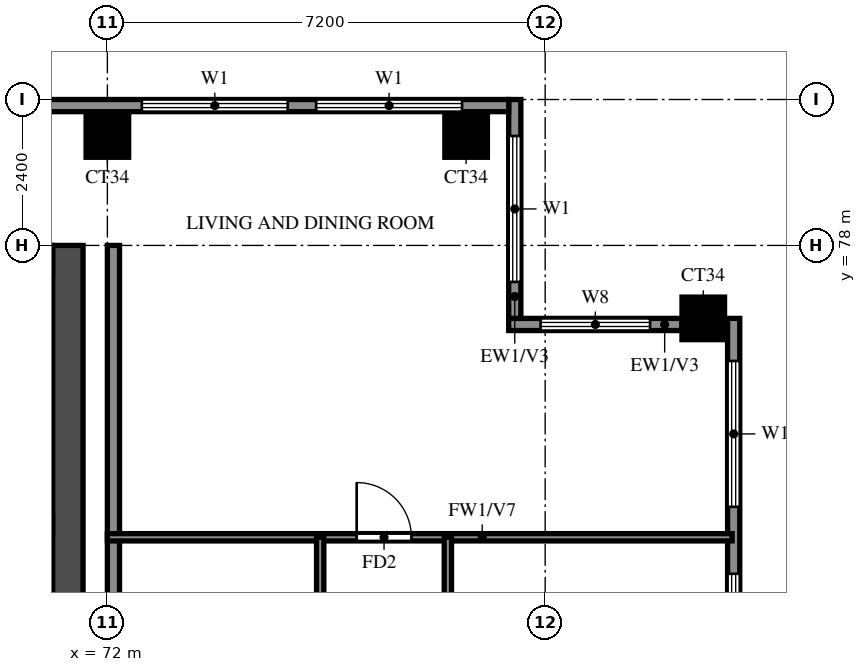
"""IFC4 building model, lengths in metres.
Left out: names, types, materials, properties, quantities, classifications, styles, units other than length and angle.
Written with IfcOpenShell. Run it as: python <this file> out.ifc"""

import sys

from ifc_helpers import new_model, si_unit, direction, frame, frame_2d, origin, origin_2d, place, context, subcontext, project, spatial, rectangle, extrude, source, transform, mapped, element, fill, save


model = new_model("IFC4")
c1 = context("Model", 3, precision=1e-05, world=origin(), true_north=direction((0.0, 1.0)))
c2 = subcontext(c1, "Body", "Model", "MODEL_VIEW")
j1 = project(units=[si_unit("LENGTHUNIT", "METRE"), si_unit("PLANEANGLEUNIT", "RADIAN")], contexts=[c1])
p1 = place(None, origin())
s1 = spatial("IfcSite", under=j1, at=p1, CompositionType="ELEMENT")
p2 = place(p1, origin())
s2 = spatial("IfcBuilding", under=s1, at=p2, CompositionType="ELEMENT")
p3 = place(p2, frame((0.0, 0.0, 222.0)))
s3 = spatial("IfcBuildingStorey", under=s2, at=p3, CompositionType="ELEMENT", Elevation=222.0)
m1 = source(origin(), c2, "Body", "SweptSolid", [
    extrude(rectangle(XDim=0.7, YDim=0.7, at=origin_2d()), origin(), (0.0, 0.0, 1.0), 3.22),
])
for number, where, z_axis, x_axis in (
    (1, (81.8, 76.8, 0.0), (0.0, 0.0, 1.0), (1.0, 0.0, 0.0)),
    (2, (72.0, 79.8, 0.0), (0.0, 0.0, 1.0), (1.0, 0.0, 0.0)),
    (3, (77.9, 79.8, 0.0), (0.0, 0.0, 1.0), (1.0, 0.0, 0.0)),
):
    element("IfcColumn", number, at=place(p3, frame(where, z_axis=z_axis, x_axis=x_axis)), inside=s3, PredefinedType="COLUMN", context=c2, shape_type="MappedRepresentation", body=[
        mapped(m1, transform((0.0, 0.0, 0.0))),
    ])
p4 = place(p3, frame((71.35, 66.15, 0.0), z_axis=(0.0, 0.0, 1.0), x_axis=(0.0, 1.0, 0.0)))
e4 = element("IfcWall", 4, at=p4, inside=s3, PredefinedType="SHEAR", context=c2, shape_type="SweptSolid", body=[
    extrude(rectangle(XDim=11.85, YDim=0.5, at=frame_2d((5.925, 0.0))), origin(), (0.0, 0.0, 1.0), 3.22),
])
p5 = place(p3, frame((29.7, 77.75, 0.0), z_axis=(0.0, 0.0, 1.0), x_axis=(1.0, 0.0, 0.0)))
e5 = element("IfcWall", 5, at=p5, inside=s3, PredefinedType="SHEAR", context=c2, shape_type="SweptSolid", body=[
    extrude(rectangle(XDim=41.4, YDim=0.5, at=frame_2d((20.7, 0.0))), origin(), (0.0, 0.0, 1.0), 3.22),
])
p6 = place(p3, frame((82.3, 48.2, 0.0), z_axis=(0.0, 0.0, 1.0), x_axis=(0.0, 1.0, 0.0)))
e6 = element("IfcWall", 6, at=p6, inside=s3, PredefinedType="SOLIDWALL", context=c2, shape_type="SweptSolid", body=[
    extrude(rectangle(XDim=28.6, YDim=0.2, at=frame_2d((14.3, 0.0))), origin(), (0.0, 0.0, 1.0), 3.22),
])
p7 = place(p6, frame((11.5, 0.0, 0.0)))
e7 = element("IfcOpeningElement", 7, at=p7, cuts=e6, PredefinedType="OPENING", context=c2, shape_type="SweptSolid", body=[
    extrude(rectangle(XDim=1.8, YDim=2.4, at=frame_2d((0.9, 1.2))), frame((0.0, 0.11, 0.0), z_axis=(0.0, -1.0, 0.0), x_axis=(1.0, 0.0, 0.0)), (0.0, 0.0, 1.0), 0.22),
])
p8 = place(p6, frame((0.6, 0.0, 0.6)))
e8 = element("IfcOpeningElement", 8, at=p8, cuts=e6, PredefinedType="OPENING", context=c2, shape_type="SweptSolid", body=[
    extrude(rectangle(XDim=2.4, YDim=2.4, at=frame_2d((1.2, 1.2))), frame((0.0, 0.11, 0.0), z_axis=(0.0, -1.0, 0.0), x_axis=(1.0, 0.0, 0.0)), (0.0, 0.0, 1.0), 0.22),
])
p9 = place(p6, frame((4.75, 0.0, 1.5)))
e9 = element("IfcOpeningElement", 9, at=p9, cuts=e6, PredefinedType="OPENING", context=c2, shape_type="SweptSolid", body=[
    extrude(rectangle(XDim=0.9, YDim=0.9, at=frame_2d((0.45, 0.45))), frame((0.0, 0.11, 0.0), z_axis=(0.0, -1.0, 0.0), x_axis=(1.0, 0.0, 0.0)), (0.0, 0.0, 1.0), 0.22),
])
p10 = place(p6, frame((7.3, 0.0, 0.6)))
e10 = element("IfcOpeningElement", 10, at=p10, cuts=e6, PredefinedType="OPENING", context=c2, shape_type="SweptSolid", body=[
    extrude(rectangle(XDim=1.8, YDim=2.4, at=frame_2d((0.9, 1.2))), frame((0.0, 0.11, 0.0), z_axis=(0.0, -1.0, 0.0), x_axis=(1.0, 0.0, 0.0)), (0.0, 0.0, 1.0), 0.22),
])
p11 = place(p6, frame((10.15, 0.0, 0.6)))
e11 = element("IfcOpeningElement", 11, at=p11, cuts=e6, PredefinedType="OPENING", context=c2, shape_type="SweptSolid", body=[
    extrude(rectangle(XDim=0.9, YDim=2.4, at=frame_2d((0.45, 1.2))), frame((0.0, 0.11, 0.0), z_axis=(0.0, -1.0, 0.0), x_axis=(1.0, 0.0, 0.0)), (0.0, 0.0, 1.0), 0.22),
])
p12 = place(p6, frame((14.5, 0.0, 0.6)))
e12 = element("IfcOpeningElement", 12, at=p12, cuts=e6, PredefinedType="OPENING", context=c2, shape_type="SweptSolid", body=[
    extrude(rectangle(XDim=1.2, YDim=2.4, at=frame_2d((0.6, 1.2))), frame((0.0, 0.11, 0.0), z_axis=(0.0, -1.0, 0.0), x_axis=(1.0, 0.0, 0.0)), (0.0, 0.0, 1.0), 0.22),
])
p13 = place(p6, frame((16.75, 0.0, 0.6)))
e13 = element("IfcOpeningElement", 13, at=p13, cuts=e6, PredefinedType="OPENING", context=c2, shape_type="SweptSolid", body=[
    extrude(rectangle(XDim=0.9, YDim=2.4, at=frame_2d((0.45, 1.2))), frame((0.0, 0.11, 0.0), z_axis=(0.0, -1.0, 0.0), x_axis=(1.0, 0.0, 0.0)), (0.0, 0.0, 1.0), 0.22),
])
p14 = place(p6, frame((18.4, 0.0, 0.6)))
e14 = element("IfcOpeningElement", 14, at=p14, cuts=e6, PredefinedType="OPENING", context=c2, shape_type="SweptSolid", body=[
    extrude(rectangle(XDim=2.4, YDim=2.4, at=frame_2d((1.2, 1.2))), frame((0.0, 0.11, 0.0), z_axis=(0.0, -1.0, 0.0), x_axis=(1.0, 0.0, 0.0)), (0.0, 0.0, 1.0), 0.22),
])
p15 = place(p6, frame((22.0, 0.0, 0.6)))
e15 = element("IfcOpeningElement", 15, at=p15, cuts=e6, PredefinedType="OPENING", context=c2, shape_type="SweptSolid", body=[
    extrude(rectangle(XDim=2.4, YDim=2.4, at=frame_2d((1.2, 1.2))), frame((0.0, 0.11, 0.0), z_axis=(0.0, -1.0, 0.0), x_axis=(1.0, 0.0, 0.0)), (0.0, 0.0, 1.0), 0.22),
])
p16 = place(p6, frame((25.5, 0.0, 0.6)))
e16 = element("IfcOpeningElement", 16, at=p16, cuts=e6, PredefinedType="OPENING", context=c2, shape_type="SweptSolid", body=[
    extrude(rectangle(XDim=2.4, YDim=2.4, at=frame_2d((1.2, 1.2))), frame((0.0, 0.11, 0.0), z_axis=(0.0, -1.0, 0.0), x_axis=(1.0, 0.0, 0.0)), (0.0, 0.0, 1.0), 0.22),
])
p17 = place(p3, frame((81.45, 76.7, 0.0), z_axis=(0.0, 0.0, 1.0), x_axis=(-1.0, 0.0, 0.0)))
e17 = element("IfcWall", 17, at=p17, inside=s3, PredefinedType="SOLIDWALL", context=c2, shape_type="SweptSolid", body=[
    extrude(rectangle(XDim=2.85, YDim=0.2, at=frame_2d((1.425, 0.0))), origin(), (0.0, 0.0, 1.0), 3.22),
])
p18 = place(p17, frame((0.525, 0.0, 0.6)))
e18 = element("IfcOpeningElement", 18, at=p18, cuts=e17, PredefinedType="OPENING", context=c2, shape_type="SweptSolid", body=[
    extrude(rectangle(XDim=1.8, YDim=2.4, at=frame_2d((0.9, 1.2))), frame((0.0, 0.11, 0.0), z_axis=(0.0, -1.0, 0.0), x_axis=(1.0, 0.0, 0.0)), (0.0, 0.0, 1.0), 0.22),
])
p19 = place(p3, frame((78.7, 76.8, 0.0), z_axis=(0.0, 0.0, 1.0), x_axis=(0.0, 1.0, 0.0)))
e19 = element("IfcWall", 19, at=p19, inside=s3, PredefinedType="SOLIDWALL", context=c2, shape_type="SweptSolid", body=[
    extrude(rectangle(XDim=3.6, YDim=0.2, at=frame_2d((1.8, 0.0))), origin(), (0.0, 0.0, 1.0), 3.22),
])
p20 = place(p19, frame((0.6, 0.0, 0.6)))
e20 = element("IfcOpeningElement", 20, at=p20, cuts=e19, PredefinedType="OPENING", context=c2, shape_type="SweptSolid", body=[
    extrude(rectangle(XDim=2.4, YDim=2.4, at=frame_2d((1.2, 1.2))), frame((0.0, 0.11, 0.0), z_axis=(0.0, -1.0, 0.0), x_axis=(1.0, 0.0, 0.0)), (0.0, 0.0, 1.0), 0.22),
])
p21 = place(p3, frame((78.6, 80.3, 0.0), z_axis=(0.0, 0.0, 1.0), x_axis=(-1.0, 0.0, 0.0)))
e21 = element("IfcWall", 21, at=p21, inside=s3, PredefinedType="SOLIDWALL", context=c2, shape_type="SweptSolid", body=[
    extrude(rectangle(XDim=56.6, YDim=0.2, at=frame_2d((28.3, 0.0))), origin(), (0.0, 0.0, 1.0), 3.22),
])
p22 = place(p21, frame((50.433, 0.0, 0.6)))
e22 = element("IfcOpeningElement", 22, at=p22, cuts=e21, PredefinedType="OPENING", context=c2, shape_type="SweptSolid", body=[
    extrude(rectangle(XDim=2.4, YDim=2.4, at=frame_2d((1.2, 1.2))), frame((0.0, 0.11, 0.0), z_axis=(0.0, -1.0, 0.0), x_axis=(1.0, 0.0, 0.0)), (0.0, 0.0, 1.0), 0.22),
])
p23 = place(p21, frame((53.367, 0.0, 0.6)))
e23 = element("IfcOpeningElement", 23, at=p23, cuts=e21, PredefinedType="OPENING", context=c2, shape_type="SweptSolid", body=[
    extrude(rectangle(XDim=2.4, YDim=2.4, at=frame_2d((1.2, 1.2))), frame((0.0, 0.11, 0.0), z_axis=(0.0, -1.0, 0.0), x_axis=(1.0, 0.0, 0.0)), (0.0, 0.0, 1.0), 0.22),
])
p24 = place(p21, frame((0.767, 0.0, 0.6)))
e24 = element("IfcOpeningElement", 24, at=p24, cuts=e21, PredefinedType="OPENING", context=c2, shape_type="SweptSolid", body=[
    extrude(rectangle(XDim=2.4, YDim=2.4, at=frame_2d((1.2, 1.2))), frame((0.0, 0.11, 0.0), z_axis=(0.0, -1.0, 0.0), x_axis=(1.0, 0.0, 0.0)), (0.0, 0.0, 1.0), 0.22),
])
p25 = place(p21, frame((3.633, 0.0, 0.6)))
e25 = element("IfcOpeningElement", 25, at=p25, cuts=e21, PredefinedType="OPENING", context=c2, shape_type="SweptSolid", body=[
    extrude(rectangle(XDim=2.4, YDim=2.4, at=frame_2d((1.2, 1.2))), frame((0.0, 0.11, 0.0), z_axis=(0.0, -1.0, 0.0), x_axis=(1.0, 0.0, 0.0)), (0.0, 0.0, 1.0), 0.22),
])
p26 = place(p3, frame((72.1, 62.4, 0.0), z_axis=(0.0, 0.0, 1.0), x_axis=(0.0, 1.0, 0.0)))
e26 = element("IfcWall", 26, at=p26, inside=s3, PredefinedType="SOLIDWALL", context=c2, shape_type="SweptSolid", body=[
    extrude(rectangle(XDim=15.6, YDim=0.2, at=frame_2d((7.8, 0.0))), origin(), (0.0, 0.0, 1.0), 3.22),
])
p27 = place(p3, frame((72.0, 73.2, 0.0), z_axis=(0.0, 0.0, 1.0), x_axis=(1.0, 0.0, 0.0)))
e27 = element("IfcWall", 27, at=p27, inside=s3, PredefinedType="PARTITIONING", context=c2, shape_type="SweptSolid", body=[
    extrude(rectangle(XDim=10.275, YDim=0.12, at=frame_2d((5.137, 0.0))), origin(), (0.0, 0.0, 1.0), 2.32),
])
p28 = place(p27, frame((4.1, 0.0, 0.0)))
e28 = element("IfcOpeningElement", 28, at=p28, cuts=e27, PredefinedType="OPENING", context=c2, shape_type="SweptSolid", body=[
    extrude(rectangle(XDim=0.9, YDim=2.1, at=frame_2d((0.45, 1.05))), frame((0.0, 0.07, 0.0), z_axis=(0.0, -1.0, 0.0), x_axis=(1.0, 0.0, 0.0)), (0.0, 0.0, 1.0), 0.14),
])
p29 = place(p3, frame((75.5, 64.8, 0.0), z_axis=(0.0, 0.0, 1.0), x_axis=(0.0, 1.0, 0.0)))
e29 = element("IfcWall", 29, at=p29, inside=s3, PredefinedType="PARTITIONING", context=c2, shape_type="SweptSolid", body=[
    extrude(rectangle(XDim=8.4, YDim=0.12, at=frame_2d((4.2, 0.0))), origin(), (0.0, 0.0, 1.0), 3.22),
])
p30 = place(p29, frame((1.925, 0.0, 0.0)))
e30 = element("IfcOpeningElement", 30, at=p30, cuts=e29, PredefinedType="OPENING", context=c2, shape_type="SweptSolid", body=[
    extrude(rectangle(XDim=0.9, YDim=2.1, at=frame_2d((0.45, 1.05))), frame((0.0, 0.07, 0.0), z_axis=(0.0, -1.0, 0.0), x_axis=(1.0, 0.0, 0.0)), (0.0, 0.0, 1.0), 0.14),
])
p31 = place(p29, frame((6.175, 0.0, 0.0)))
e31 = element("IfcOpeningElement", 31, at=p31, cuts=e29, PredefinedType="OPENING", context=c2, shape_type="SweptSolid", body=[
    extrude(rectangle(XDim=0.8, YDim=2.1, at=frame_2d((0.4, 1.05))), frame((0.0, 0.07, 0.0), z_axis=(0.0, -1.0, 0.0), x_axis=(1.0, 0.0, 0.0)), (0.0, 0.0, 1.0), 0.14),
])
p32 = place(p3, frame((77.6, 55.2, 0.0), z_axis=(0.0, 0.0, 1.0), x_axis=(0.0, 1.0, 0.0)))
e32 = element("IfcWall", 32, at=p32, inside=s3, PredefinedType="PARTITIONING", context=c2, shape_type="SweptSolid", body=[
    extrude(rectangle(XDim=18.0, YDim=0.12, at=frame_2d((9.0, 0.0))), origin(), (0.0, 0.0, 1.0), 3.22),
])
p33 = place(p32, frame((2.85, 0.0, 0.0)))
e33 = element("IfcOpeningElement", 33, at=p33, cuts=e32, PredefinedType="OPENING", context=c2, shape_type="SweptSolid", body=[
    extrude(rectangle(XDim=1.5, YDim=2.1, at=frame_2d((0.75, 1.05))), frame((0.0, 0.07, 0.0), z_axis=(0.0, -1.0, 0.0), x_axis=(1.0, 0.0, 0.0)), (0.0, 0.0, 1.0), 0.14),
])
p34 = place(p32, frame((8.55, 0.0, 0.0)))
e34 = element("IfcOpeningElement", 34, at=p34, cuts=e32, PredefinedType="OPENING", context=c2, shape_type="SweptSolid", body=[
    extrude(rectangle(XDim=0.9, YDim=2.1, at=frame_2d((0.45, 1.05))), frame((0.0, 0.07, 0.0), z_axis=(0.0, -1.0, 0.0), x_axis=(1.0, 0.0, 0.0)), (0.0, 0.0, 1.0), 0.14),
])
p35 = place(p32, frame((12.15, 0.0, 0.0)))
e35 = element("IfcOpeningElement", 35, at=p35, cuts=e32, PredefinedType="OPENING", context=c2, shape_type="SweptSolid", body=[
    extrude(rectangle(XDim=0.9, YDim=2.1, at=frame_2d((0.45, 1.05))), frame((0.0, 0.07, 0.0), z_axis=(0.0, -1.0, 0.0), x_axis=(1.0, 0.0, 0.0)), (0.0, 0.0, 1.0), 0.14),
])
p36 = place(p32, frame((15.75, 0.0, 0.0)))
e36 = element("IfcOpeningElement", 36, at=p36, cuts=e32, PredefinedType="OPENING", context=c2, shape_type="SweptSolid", body=[
    extrude(rectangle(XDim=0.9, YDim=2.1, at=frame_2d((0.45, 1.05))), frame((0.0, 0.07, 0.0), z_axis=(0.0, -1.0, 0.0), x_axis=(1.0, 0.0, 0.0)), (0.0, 0.0, 1.0), 0.14),
])
p37 = place(p15, origin())
e37 = element("IfcWindow", 37, at=p37, inside=s3, PartitioningType="DOUBLE_PANEL_VERTICAL", PredefinedType="WINDOW", context=c2, shape_type="SweptSolid", body=[
    extrude(rectangle(XDim=2.4, YDim=2.4, at=frame_2d((1.2, 1.2))), frame((0.0, 0.03, 0.0), z_axis=(0.0, -1.0, 0.0), x_axis=(1.0, 0.0, 0.0)), (0.0, 0.0, 1.0), 0.06),
])
fill(e15, e37)
p38 = place(p16, origin())
e38 = element("IfcWindow", 38, at=p38, inside=s3, PartitioningType="DOUBLE_PANEL_VERTICAL", PredefinedType="WINDOW", context=c2, shape_type="SweptSolid", body=[
    extrude(rectangle(XDim=2.4, YDim=2.4, at=frame_2d((1.2, 1.2))), frame((0.0, 0.03, 0.0), z_axis=(0.0, -1.0, 0.0), x_axis=(1.0, 0.0, 0.0)), (0.0, 0.0, 1.0), 0.06),
])
fill(e16, e38)
p39 = place(p18, origin())
e39 = element("IfcWindow", 39, at=p39, inside=s3, PartitioningType="DOUBLE_PANEL_VERTICAL", PredefinedType="WINDOW", context=c2, shape_type="SweptSolid", body=[
    extrude(rectangle(XDim=1.8, YDim=2.4, at=frame_2d((0.9, 1.2))), frame((0.0, 0.03, 0.0), z_axis=(0.0, -1.0, 0.0), x_axis=(1.0, 0.0, 0.0)), (0.0, 0.0, 1.0), 0.06),
])
fill(e18, e39)
p40 = place(p20, origin())
e40 = element("IfcWindow", 40, at=p40, inside=s3, PartitioningType="DOUBLE_PANEL_VERTICAL", PredefinedType="WINDOW", context=c2, shape_type="SweptSolid", body=[
    extrude(rectangle(XDim=2.4, YDim=2.4, at=frame_2d((1.2, 1.2))), frame((0.0, 0.03, 0.0), z_axis=(0.0, -1.0, 0.0), x_axis=(1.0, 0.0, 0.0)), (0.0, 0.0, 1.0), 0.06),
])
fill(e20, e40)
p41 = place(p24, origin())
e41 = element("IfcWindow", 41, at=p41, inside=s3, PartitioningType="DOUBLE_PANEL_VERTICAL", PredefinedType="WINDOW", context=c2, shape_type="SweptSolid", body=[
    extrude(rectangle(XDim=2.4, YDim=2.4, at=frame_2d((1.2, 1.2))), frame((0.0, 0.03, 0.0), z_axis=(0.0, -1.0, 0.0), x_axis=(1.0, 0.0, 0.0)), (0.0, 0.0, 1.0), 0.06),
])
fill(e24, e41)
p42 = place(p25, origin())
e42 = element("IfcWindow", 42, at=p42, inside=s3, PartitioningType="DOUBLE_PANEL_VERTICAL", PredefinedType="WINDOW", context=c2, shape_type="SweptSolid", body=[
    extrude(rectangle(XDim=2.4, YDim=2.4, at=frame_2d((1.2, 1.2))), frame((0.0, 0.03, 0.0), z_axis=(0.0, -1.0, 0.0), x_axis=(1.0, 0.0, 0.0)), (0.0, 0.0, 1.0), 0.06),
])
fill(e25, e42)
p43 = place(p28, origin())
e43 = element("IfcDoor", 43, at=p43, inside=s3, OperationType="SINGLE_SWING_LEFT", PredefinedType="DOOR", context=c2, shape_type="SweptSolid", body=[
    extrude(rectangle(XDim=0.9, YDim=2.1, at=frame_2d((0.45, 1.05))), frame((0.0, 0.025, 0.0), z_axis=(0.0, -1.0, 0.0), x_axis=(1.0, 0.0, 0.0)), (0.0, 0.0, 1.0), 0.05),
])
fill(e28, e43)
save(model, sys.argv[1])
